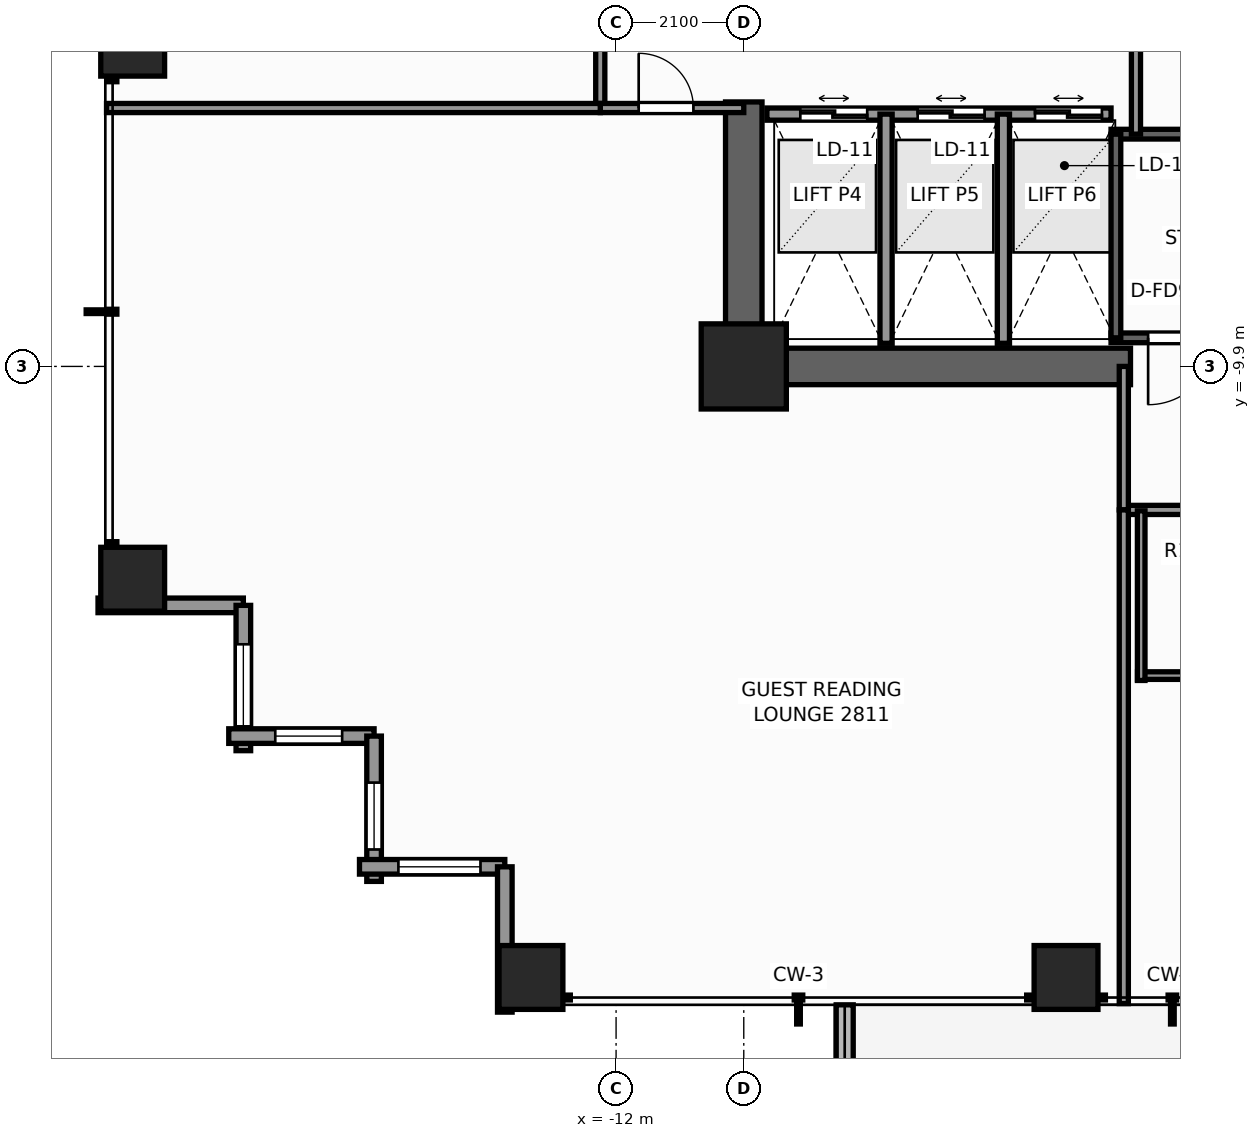
"""IFC4 building model, lengths in metres.
Left out: names, types, materials, properties, quantities, classifications, styles, units other than length and angle.
Written with IfcOpenShell. Run it as: python <this file> out.ifc"""

import sys

from ifc_helpers import new_model, si_unit, direction, frame, frame_2d, origin, origin_2d, place, context, subcontext, project, spatial, rectangle, extrude, element, fill, save


model = new_model("IFC4")
c1 = context("Model", 3, precision=1e-05, world=origin(), true_north=direction((0.0, 1.0)))
c2 = subcontext(c1, "Body", "Model", "MODEL_VIEW")
j1 = project(units=[si_unit("LENGTHUNIT", "METRE"), si_unit("PLANEANGLEUNIT", "RADIAN")], contexts=[c1])
p1 = place(None, origin())
s1 = spatial("IfcSite", under=j1, at=p1, CompositionType="ELEMENT")
p2 = place(p1, origin())
s2 = spatial("IfcBuilding", under=s1, at=p2, CompositionType="ELEMENT")
p3 = place(p2, frame((0.0, 0.0, 98.6)))
s3 = spatial("IfcBuildingStorey", under=s2, at=p3, CompositionType="ELEMENT", Elevation=98.6)
p4 = place(p3, frame((-3.54, -9.9, 0.0), z_axis=(0.0, 0.0, 1.0), x_axis=(-1.0, 0.0, 0.0)))
e1 = element("IfcWall", 1, at=p4, inside=s3, PredefinedType="SHEAR", context=c2, shape_type="SweptSolid", body=[
    extrude(rectangle(XDim=6.66, YDim=0.6, at=frame_2d((3.33, 0.0))), origin(), (0.0, 0.0, 1.0), 3.3),
])
p5 = place(p3, frame((-9.9, -9.6, 0.0), z_axis=(0.0, 0.0, 1.0), x_axis=(0.0, 1.0, 0.0)))
e2 = element("IfcWall", 2, at=p5, inside=s3, PredefinedType="SHEAR", context=c2, shape_type="SweptSolid", body=[
    extrude(rectangle(XDim=4.05, YDim=0.6, at=frame_2d((2.025, 0.0))), origin(), (0.0, 0.0, 1.0), 3.3),
])
p6 = place(p3, frame((-9.9, -9.9, 0.0), z_axis=(0.0, 0.0, 1.0), x_axis=(1.0, 0.0, 0.0)))
e3 = element("IfcColumn", 3, at=p6, inside=s3, PredefinedType="COLUMN", context=c2, shape_type="SweptSolid", body=[
    extrude(rectangle(XDim=1.4, YDim=1.4, at=origin_2d()), origin(), (0.0, 0.0, 1.0), 3.3),
])
for number, where, z_axis, x_axis in (
    (4, (-13.4, -19.95, 0.0), (0.0, 0.0, 1.0), (1.0, 0.0, 0.0)),
    (5, (-4.6, -19.95, 0.0), (0.0, 0.0, 1.0), (1.0, 0.0, 0.0)),
    (6, (-19.95, -13.4, 0.0), (0.0, 0.0, 1.0), (1.0, 0.0, 0.0)),
    (7, (-19.95, -4.6, 0.0), (0.0, 0.0, 1.0), (1.0, 0.0, 0.0)),
):
    element("IfcColumn", number, at=place(p3, frame(where, z_axis=z_axis, x_axis=x_axis)), inside=s3, PredefinedType="COLUMN", context=c2, shape_type="SweptSolid", body=[
        extrude(rectangle(XDim=1.05, YDim=1.05, at=origin_2d()), origin(), (0.0, 0.0, 1.0), 3.3),
    ])
p7 = place(p3, frame((-8.24, -20.4, -0.04), z_axis=(0.0, 0.0, 1.0), x_axis=(0.0, -1.0, 0.0)))
e8 = element("IfcWall", 8, at=p7, inside=s3, PredefinedType="PARAPET", context=c2, shape_type="SweptSolid", body=[
    extrude(rectangle(XDim=1.466, YDim=0.28, at=frame_2d((0.733, 0.0))), origin(), (0.0, 0.0, 1.0), 0.42),
])
p8 = place(p3, frame((-18.13, -13.83, 0.0), z_axis=(0.0, 0.0, 1.0), x_axis=(-1.0, 0.0, 0.0)))
e9 = element("IfcWall", 9, at=p8, inside=s3, PredefinedType="STANDARD", context=c2, shape_type="SweptSolid", body=[
    extrude(rectangle(XDim=2.39, YDim=0.24, at=frame_2d((1.195, 0.0))), origin(), (0.0, 0.0, 1.0), 2.459),
])
p9 = place(p3, frame((-18.13, -16.22, 0.0), z_axis=(0.0, 0.0, 1.0), x_axis=(0.0, 1.0, 0.0)))
e10 = element("IfcWall", 10, at=p9, inside=s3, PredefinedType="STANDARD", context=c2, shape_type="SweptSolid", body=[
    extrude(rectangle(XDim=2.39, YDim=0.24, at=frame_2d((1.195, 0.0))), origin(), (0.0, 0.0, 1.0), 2.459),
])
p10 = place(p9, frame((0.4, 0.0, 0.65)))
e11 = element("IfcOpeningElement", 11, at=p10, cuts=e10, PredefinedType="OPENING", context=c2, shape_type="SweptSolid", body=[
    extrude(rectangle(XDim=1.35, YDim=1.55, at=frame_2d((0.675, 0.775))), frame((0.0, 0.13, 0.0), z_axis=(0.0, -1.0, 0.0), x_axis=(1.0, 0.0, 0.0)), (0.0, 0.0, 1.0), 0.26),
])
p11 = place(p3, frame((-15.98, -15.98, 0.0), z_axis=(0.0, 0.0, 1.0), x_axis=(-1.0, 0.0, 0.0)))
e12 = element("IfcWall", 12, at=p11, inside=s3, PredefinedType="STANDARD", context=c2, shape_type="SweptSolid", body=[
    extrude(rectangle(XDim=2.39, YDim=0.24, at=frame_2d((1.195, 0.0))), origin(), (0.0, 0.0, 1.0), 2.459),
])
p12 = place(p11, frame((0.525, 0.0, 0.65)))
e13 = element("IfcOpeningElement", 13, at=p12, cuts=e12, PredefinedType="OPENING", context=c2, shape_type="SweptSolid", body=[
    extrude(rectangle(XDim=1.1, YDim=1.45, at=frame_2d((0.55, 0.725))), frame((0.0, 0.13, 0.0), z_axis=(0.0, -1.0, 0.0), x_axis=(1.0, 0.0, 0.0)), (0.0, 0.0, 1.0), 0.26),
])
p13 = place(p3, frame((-15.98, -18.37, 0.0), z_axis=(0.0, 0.0, 1.0), x_axis=(0.0, 1.0, 0.0)))
e14 = element("IfcWall", 14, at=p13, inside=s3, PredefinedType="STANDARD", context=c2, shape_type="SweptSolid", body=[
    extrude(rectangle(XDim=2.39, YDim=0.24, at=frame_2d((1.195, 0.0))), origin(), (0.0, 0.0, 1.0), 2.459),
])
p14 = place(p13, frame((0.525, 0.0, 0.65)))
e15 = element("IfcOpeningElement", 15, at=p14, cuts=e14, PredefinedType="OPENING", context=c2, shape_type="SweptSolid", body=[
    extrude(rectangle(XDim=1.1, YDim=1.45, at=frame_2d((0.55, 0.725))), frame((0.0, 0.13, 0.0), z_axis=(0.0, -1.0, 0.0), x_axis=(1.0, 0.0, 0.0)), (0.0, 0.0, 1.0), 0.26),
])
p15 = place(p3, frame((-13.83, -18.13, 0.0), z_axis=(0.0, 0.0, 1.0), x_axis=(-1.0, 0.0, 0.0)))
e16 = element("IfcWall", 16, at=p15, inside=s3, PredefinedType="STANDARD", context=c2, shape_type="SweptSolid", body=[
    extrude(rectangle(XDim=2.39, YDim=0.24, at=frame_2d((1.195, 0.0))), origin(), (0.0, 0.0, 1.0), 2.459),
])
p16 = place(p15, frame((0.4, 0.0, 0.65)))
e17 = element("IfcOpeningElement", 17, at=p16, cuts=e16, PredefinedType="OPENING", context=c2, shape_type="SweptSolid", body=[
    extrude(rectangle(XDim=1.35, YDim=1.55, at=frame_2d((0.675, 0.775))), frame((0.0, 0.13, 0.0), z_axis=(0.0, -1.0, 0.0), x_axis=(1.0, 0.0, 0.0)), (0.0, 0.0, 1.0), 0.26),
])
p17 = place(p3, frame((-13.83, -20.52, 0.0), z_axis=(0.0, 0.0, 1.0), x_axis=(0.0, 1.0, 0.0)))
e18 = element("IfcWall", 18, at=p17, inside=s3, PredefinedType="STANDARD", context=c2, shape_type="SweptSolid", body=[
    extrude(rectangle(XDim=2.39, YDim=0.24, at=frame_2d((1.195, 0.0))), origin(), (0.0, 0.0, 1.0), 2.459),
])
p18 = place(p3, frame((3.86, -9.43, 0.0), z_axis=(0.0, 0.0, 1.0), x_axis=(-1.0, 0.0, 0.0)))
e19 = element("IfcWall", 19, at=p18, inside=s3, PredefinedType="SHEAR", context=c2, shape_type="SweptSolid", body=[
    extrude(rectangle(XDim=7.72, YDim=0.16, at=frame_2d((3.86, 0.0))), origin(), (0.0, 0.0, 1.0), 3.3),
])
p19 = place(p18, frame((6.01, 0.0, 0.0)))
e20 = element("IfcOpeningElement", 20, at=p19, cuts=e19, PredefinedType="OPENING", context=c2, shape_type="SweptSolid", body=[
    extrude(rectangle(XDim=1.1, YDim=2.2, at=frame_2d((0.55, 1.1))), frame((0.0, 0.09, 0.0), z_axis=(0.0, -1.0, 0.0), x_axis=(1.0, 0.0, 0.0)), (0.0, 0.0, 1.0), 0.18),
])
p20 = place(p3, frame((-3.86, -6.08, 0.0), z_axis=(0.0, 0.0, 1.0), x_axis=(1.0, 0.0, 0.0)))
e21 = element("IfcWall", 21, at=p20, inside=s3, PredefinedType="SHEAR", context=c2, shape_type="SweptSolid", body=[
    extrude(rectangle(XDim=7.72, YDim=0.16, at=frame_2d((3.86, 0.0))), origin(), (0.0, 0.0, 1.0), 3.3),
])
p21 = place(p3, frame((-3.78, -9.43, 0.0), z_axis=(0.0, 0.0, 1.0), x_axis=(0.0, 1.0, 0.0)))
e22 = element("IfcWall", 22, at=p21, inside=s3, PredefinedType="SHEAR", context=c2, shape_type="SweptSolid", body=[
    extrude(rectangle(XDim=3.35, YDim=0.16, at=frame_2d((1.675, 0.0))), origin(), (0.0, 0.0, 1.0), 3.3),
])
p22 = place(p3, frame((-9.52, -5.75, 0.0), z_axis=(0.0, 0.0, 1.0), x_axis=(1.0, 0.0, 0.0)))
e23 = element("IfcWall", 23, at=p22, inside=s3, PredefinedType="SOLIDWALL", context=c2, shape_type="SweptSolid", body=[
    extrude(rectangle(XDim=5.66, YDim=0.2, at=frame_2d((2.83, 0.0))), origin(), (0.0, 0.0, 1.0), 3.08),
])
p23 = place(p22, frame((0.55, 0.0, 0.0)))
e24 = element("IfcOpeningElement", 24, at=p23, cuts=e23, PredefinedType="OPENING", context=c2, shape_type="SweptSolid", body=[
    extrude(rectangle(XDim=1.1, YDim=2.2, at=frame_2d((0.55, 1.1))), frame((0.0, 0.11, 0.0), z_axis=(0.0, -1.0, 0.0), x_axis=(1.0, 0.0, 0.0)), (0.0, 0.0, 1.0), 0.22),
])
p24 = place(p22, frame((2.48, 0.0, 0.0)))
e25 = element("IfcOpeningElement", 25, at=p24, cuts=e23, PredefinedType="OPENING", context=c2, shape_type="SweptSolid", body=[
    extrude(rectangle(XDim=1.1, YDim=2.2, at=frame_2d((0.55, 1.1))), frame((0.0, 0.11, 0.0), z_axis=(0.0, -1.0, 0.0), x_axis=(1.0, 0.0, 0.0)), (0.0, 0.0, 1.0), 0.22),
])
p25 = place(p22, frame((4.41, 0.0, 0.0)))
e26 = element("IfcOpeningElement", 26, at=p25, cuts=e23, PredefinedType="OPENING", context=c2, shape_type="SweptSolid", body=[
    extrude(rectangle(XDim=1.1, YDim=2.2, at=frame_2d((0.55, 1.1))), frame((0.0, 0.11, 0.0), z_axis=(0.0, -1.0, 0.0), x_axis=(1.0, 0.0, 0.0)), (0.0, 0.0, 1.0), 0.22),
])
for number, where, z_axis, x_axis in (
    (27, (-7.56, -9.52, 0.0), (0.0, 0.0, 1.0), (0.0, 1.0, 0.0)),
    (28, (-5.63, -9.52, 0.0), (0.0, 0.0, 1.0), (0.0, 1.0, 0.0)),
):
    element("IfcWall", number, at=place(p3, frame(where, z_axis=z_axis, x_axis=x_axis)), inside=s3, PredefinedType="SOLIDWALL", context=c2, shape_type="SweptSolid", body=[
        extrude(rectangle(XDim=3.77, YDim=0.2, at=frame_2d((1.885, 0.0))), origin(), (0.0, 0.0, 1.0), 3.08),
    ])
p26 = place(p3, frame((-3.45, -6.08, 0.0), z_axis=(0.0, 0.0, 1.0), x_axis=(0.0, 1.0, 0.0)))
e29 = element("IfcWall", 29, at=p26, inside=s3, PredefinedType="PARTITIONING", context=c2, shape_type="SweptSolid", body=[
    extrude(rectangle(XDim=2.36, YDim=0.15, at=frame_2d((1.18, 0.0))), origin(), (0.0, 0.0, 1.0), 3.08),
])
p27 = place(p3, frame((-3.65, -12.26, 0.0), z_axis=(0.0, 0.0, 1.0), x_axis=(1.0, 0.0, 0.0)))
e30 = element("IfcWall", 30, at=p27, inside=s3, PredefinedType="PARTITIONING", context=c2, shape_type="SweptSolid", body=[
    extrude(rectangle(XDim=15.91, YDim=0.15, at=frame_2d((7.955, 0.0))), origin(), (0.0, 0.0, 1.0), 2.292),
])
p28 = place(p27, frame((5.205, 0.0, 0.0)))
e31 = element("IfcOpeningElement", 31, at=p28, cuts=e30, PredefinedType="OPENING", context=c2, shape_type="SweptSolid", body=[
    extrude(rectangle(XDim=0.95, YDim=2.06, at=frame_2d((0.475, 1.03))), frame((0.0, 0.085, 0.0), z_axis=(0.0, -1.0, 0.0), x_axis=(1.0, 0.0, 0.0)), (0.0, 0.0, 1.0), 0.17),
])
p29 = place(p27, frame((11.026, 0.0, 0.0)))
e32 = element("IfcOpeningElement", 32, at=p29, cuts=e30, PredefinedType="OPENING", context=c2, shape_type="SweptSolid", body=[
    extrude(rectangle(XDim=0.95, YDim=2.06, at=frame_2d((0.475, 1.03))), frame((0.0, 0.085, 0.0), z_axis=(0.0, -1.0, 0.0), x_axis=(1.0, 0.0, 0.0)), (0.0, 0.0, 1.0), 0.17),
])
p30 = place(p3, frame((-3.65, -12.26, 0.0), z_axis=(0.0, 0.0, 1.0), x_axis=(0.0, 1.0, 0.0)))
e33 = element("IfcWall", 33, at=p30, inside=s3, PredefinedType="PARTITIONING", context=c2, shape_type="SweptSolid", body=[
    extrude(rectangle(XDim=2.36, YDim=0.15, at=frame_2d((1.18, 0.0))), origin(), (0.0, 0.0, 1.0), 3.08),
])
p31 = place(p3, frame((-12.26, -5.65, 0.0), z_axis=(0.0, 0.0, 1.0), x_axis=(0.0, 1.0, 0.0)))
e34 = element("IfcWall", 34, at=p31, inside=s3, PredefinedType="PARTITIONING", context=c2, shape_type="SweptSolid", body=[
    extrude(rectangle(XDim=3.6, YDim=0.15, at=frame_2d((1.8, 0.0))), origin(), (0.0, 0.0, 1.0), 2.292),
])
p32 = place(p31, frame((2.156, 0.0, 0.0)))
e35 = element("IfcOpeningElement", 35, at=p32, cuts=e34, PredefinedType="OPENING", context=c2, shape_type="SweptSolid", body=[
    extrude(rectangle(XDim=0.9, YDim=2.06, at=frame_2d((0.45, 1.03))), frame((0.0, 0.085, 0.0), z_axis=(0.0, -1.0, 0.0), x_axis=(1.0, 0.0, 0.0)), (0.0, 0.0, 1.0), 0.17),
])
p33 = place(p3, frame((-12.26, -5.65, 0.0), z_axis=(0.0, 0.0, 1.0), x_axis=(1.0, 0.0, 0.0)))
e36 = element("IfcWall", 36, at=p33, inside=s3, PredefinedType="PARTITIONING", context=c2, shape_type="SweptSolid", body=[
    extrude(rectangle(XDim=2.36, YDim=0.15, at=frame_2d((1.18, 0.0))), origin(), (0.0, 0.0, 1.0), 3.08),
])
p34 = place(p33, frame((0.632, 0.0, 0.0)))
e37 = element("IfcOpeningElement", 37, at=p34, cuts=e36, PredefinedType="OPENING", context=c2, shape_type="SweptSolid", body=[
    extrude(rectangle(XDim=0.9, YDim=2.06, at=frame_2d((0.45, 1.03))), frame((0.0, 0.085, 0.0), z_axis=(0.0, -1.0, 0.0), x_axis=(1.0, 0.0, 0.0)), (0.0, 0.0, 1.0), 0.17),
])
for number, where, z_axis, x_axis in (
    (38, (-20.38, -5.65, 0.0), (0.0, 0.0, 1.0), (1.0, 0.0, 0.0)),
    (39, (-3.65, -20.38, 0.0), (0.0, 0.0, 1.0), (0.0, 1.0, 0.0)),
):
    element("IfcWall", number, at=place(p3, frame(where, z_axis=z_axis, x_axis=x_axis)), inside=s3, PredefinedType="PARTITIONING", context=c2, shape_type="SweptSolid", body=[
        extrude(rectangle(XDim=8.12, YDim=0.15, at=frame_2d((4.06, 0.0))), origin(), (0.0, 0.0, 1.0), 2.449),
    ])
p35 = place(p3, frame((-3.424, -14.985, 0.0), z_axis=(0.0, 0.0, 1.0), x_axis=(1.0, 0.0, 0.0)))
e40 = element("IfcWall", 40, at=p35, inside=s3, PredefinedType="PARTITIONING", context=c2, shape_type="SweptSolid", body=[
    extrude(rectangle(XDim=2.37, YDim=0.125, at=frame_2d((1.185, 0.0))), origin(), (0.0, 0.0, 1.0), 3.08),
])
p36 = place(p3, frame((-3.364, -15.065, 0.0), z_axis=(0.0, 0.0, 1.0), x_axis=(0.0, 1.0, 0.0)))
e41 = element("IfcWall", 41, at=p36, inside=s3, PredefinedType="PARTITIONING", context=c2, shape_type="SweptSolid", body=[
    extrude(rectangle(XDim=2.79, YDim=0.125, at=frame_2d((1.395, 0.0))), origin(), (0.0, 0.0, 1.0), 3.08),
])
p37 = place(p10, origin())
e42 = element("IfcWindow", 42, at=p37, inside=s3, PartitioningType="SINGLE_PANEL", PredefinedType="WINDOW", context=c2, shape_type="SweptSolid", body=[
    extrude(rectangle(XDim=1.35, YDim=1.55, at=frame_2d((0.675, 0.775))), frame((0.0, 0.03, 0.0), z_axis=(0.0, -1.0, 0.0), x_axis=(1.0, 0.0, 0.0)), (0.0, 0.0, 1.0), 0.06),
])
fill(e11, e42)
p38 = place(p12, origin())
e43 = element("IfcWindow", 43, at=p38, inside=s3, PartitioningType="SINGLE_PANEL", PredefinedType="WINDOW", context=c2, shape_type="SweptSolid", body=[
    extrude(rectangle(XDim=1.1, YDim=1.45, at=frame_2d((0.55, 0.725))), frame((0.0, 0.03, 0.0), z_axis=(0.0, -1.0, 0.0), x_axis=(1.0, 0.0, 0.0)), (0.0, 0.0, 1.0), 0.06),
])
fill(e13, e43)
p39 = place(p14, origin())
e44 = element("IfcWindow", 44, at=p39, inside=s3, PartitioningType="SINGLE_PANEL", PredefinedType="WINDOW", context=c2, shape_type="SweptSolid", body=[
    extrude(rectangle(XDim=1.1, YDim=1.45, at=frame_2d((0.55, 0.725))), frame((0.0, 0.03, 0.0), z_axis=(0.0, -1.0, 0.0), x_axis=(1.0, 0.0, 0.0)), (0.0, 0.0, 1.0), 0.06),
])
fill(e15, e44)
p40 = place(p16, origin())
e45 = element("IfcWindow", 45, at=p40, inside=s3, PartitioningType="SINGLE_PANEL", PredefinedType="WINDOW", context=c2, shape_type="SweptSolid", body=[
    extrude(rectangle(XDim=1.35, YDim=1.55, at=frame_2d((0.675, 0.775))), frame((0.0, 0.03, 0.0), z_axis=(0.0, -1.0, 0.0), x_axis=(1.0, 0.0, 0.0)), (0.0, 0.0, 1.0), 0.06),
])
fill(e17, e45)
p41 = place(p19, origin())
e46 = element("IfcDoor", 46, at=p41, inside=s3, OperationType="SINGLE_SWING_RIGHT", PredefinedType="DOOR", context=c2, shape_type="SweptSolid", body=[
    extrude(rectangle(XDim=1.1, YDim=2.2, at=frame_2d((0.55, 1.1))), frame((0.0, 0.025, 0.0), z_axis=(0.0, -1.0, 0.0), x_axis=(1.0, 0.0, 0.0)), (0.0, 0.0, 1.0), 0.05),
])
fill(e20, e46)
p42 = place(p23, origin())
e47 = element("IfcDoor", 47, at=p42, inside=s3, OperationType="DOUBLE_DOOR_SLIDING", PredefinedType="DOOR", context=c2, shape_type="SweptSolid", body=[
    extrude(rectangle(XDim=1.1, YDim=2.2, at=frame_2d((0.55, 1.1))), frame((0.0, 0.025, 0.0), z_axis=(0.0, -1.0, 0.0), x_axis=(1.0, 0.0, 0.0)), (0.0, 0.0, 1.0), 0.05),
])
fill(e24, e47)
p43 = place(p24, origin())
e48 = element("IfcDoor", 48, at=p43, inside=s3, OperationType="DOUBLE_DOOR_SLIDING", PredefinedType="DOOR", context=c2, shape_type="SweptSolid", body=[
    extrude(rectangle(XDim=1.1, YDim=2.2, at=frame_2d((0.55, 1.1))), frame((0.0, 0.025, 0.0), z_axis=(0.0, -1.0, 0.0), x_axis=(1.0, 0.0, 0.0)), (0.0, 0.0, 1.0), 0.05),
])
fill(e25, e48)
p44 = place(p25, origin())
e49 = element("IfcDoor", 49, at=p44, inside=s3, OperationType="DOUBLE_DOOR_SLIDING", PredefinedType="DOOR", context=c2, shape_type="SweptSolid", body=[
    extrude(rectangle(XDim=1.1, YDim=2.2, at=frame_2d((0.55, 1.1))), frame((0.0, 0.025, 0.0), z_axis=(0.0, -1.0, 0.0), x_axis=(1.0, 0.0, 0.0)), (0.0, 0.0, 1.0), 0.05),
])
fill(e26, e49)
p45 = place(p34, origin())
e50 = element("IfcDoor", 50, at=p45, inside=s3, OperationType="SINGLE_SWING_LEFT", PredefinedType="DOOR", context=c2, shape_type="SweptSolid", body=[
    extrude(rectangle(XDim=0.9, YDim=2.06, at=frame_2d((0.45, 1.03))), frame((0.0, 0.025, 0.0), z_axis=(0.0, -1.0, 0.0), x_axis=(1.0, 0.0, 0.0)), (0.0, 0.0, 1.0), 0.05),
])
fill(e37, e50)
save(model, sys.argv[1])
